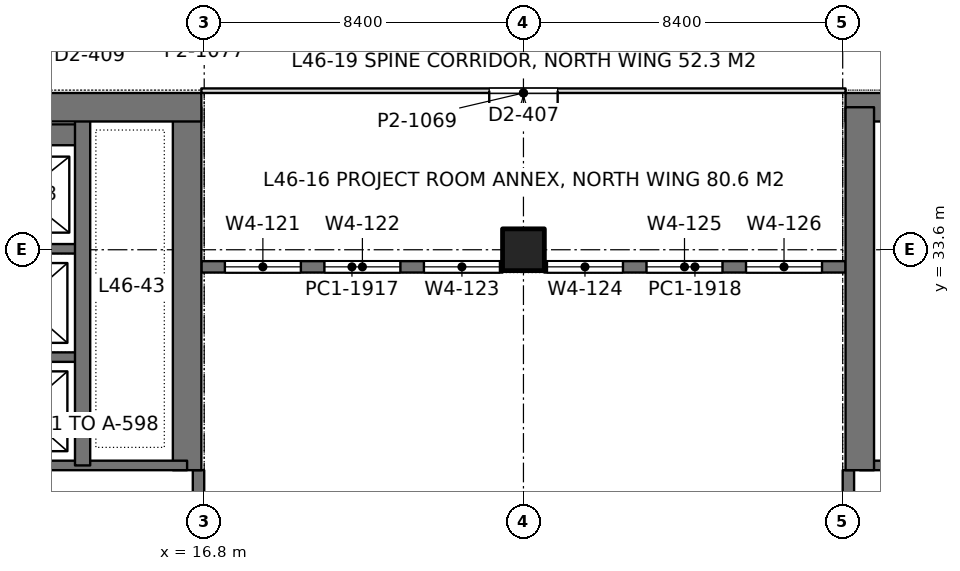
"""IFC4 building model, lengths in metres.
Left out: names, types, materials, properties, quantities, classifications, styles, units other than length and angle.
Written with IfcOpenShell. Run it as: python <this file> out.ifc"""

import sys

from ifc_helpers import new_model, si_unit, direction, frame, frame_2d, origin, origin_2d, place, context, subcontext, project, spatial, rectangle, extrude, element, fill, save


model = new_model("IFC4")
c1 = context("Model", 3, precision=1e-05, world=origin(), true_north=direction((0.0, 1.0)))
c2 = subcontext(c1, "Body", "Model", "MODEL_VIEW")
j1 = project(units=[si_unit("LENGTHUNIT", "METRE"), si_unit("PLANEANGLEUNIT", "RADIAN")], contexts=[c1])
p1 = place(None, origin())
s1 = spatial("IfcSite", under=j1, at=p1, CompositionType="ELEMENT")
p2 = place(p1, origin())
s2 = spatial("IfcBuilding", under=s1, at=p2, CompositionType="ELEMENT")
p3 = place(p2, frame((0.0, 0.0, 202.8)))
s3 = spatial("IfcBuildingStorey", under=s2, at=p3, CompositionType="ELEMENT", Elevation=202.8)
p4 = place(p3, frame((25.2, 33.6, 0.0), z_axis=(0.0, 0.0, 1.0), x_axis=(1.0, 0.0, 0.0)))
e1 = element("IfcColumn", 1, at=p4, inside=s3, PredefinedType="COLUMN", context=c2, shape_type="SweptSolid", body=[
    extrude(rectangle(XDim=1.1, YDim=1.1, at=origin_2d()), origin(), (0.0, 0.0, 1.0), 4.2),
])
p5 = place(p3, frame((-1.125, 37.35, 0.0), z_axis=(0.0, 0.0, 1.0), x_axis=(1.0, 0.0, 0.0)))
e2 = element("IfcWall", 2, at=p5, inside=s3, PredefinedType="SHEAR", context=c2, shape_type="SweptSolid", body=[
    extrude(rectangle(XDim=17.85, YDim=0.75, at=frame_2d((8.925, 0.0))), origin(), (0.0, 0.0, 1.0), 4.2),
])
p6 = place(p5, frame((8.875, 0.0, 0.0)))
e3 = element("IfcOpeningElement", 3, at=p6, cuts=e2, PredefinedType="OPENING", context=c2, shape_type="SweptSolid", body=[
    extrude(rectangle(XDim=1.8, YDim=2.4, at=frame_2d((0.9, 1.2))), frame((0.0, 0.385, 0.0), z_axis=(0.0, -1.0, 0.0), x_axis=(1.0, 0.0, 0.0)), (0.0, 0.0, 1.0), 0.77),
])
p7 = place(p3, frame((16.35, 27.8, 0.0), z_axis=(0.0, 0.0, 1.0), x_axis=(0.0, 1.0, 0.0)))
e4 = element("IfcWall", 4, at=p7, inside=s3, PredefinedType="SHEAR", context=c2, shape_type="SweptSolid", body=[
    extrude(rectangle(XDim=9.55, YDim=0.75, at=frame_2d((4.775, 0.0))), origin(), (0.0, 0.0, 1.0), 4.2),
])
p8 = place(p3, frame((13.6, 27.925, 0.0), z_axis=(0.0, 0.0, 1.0), x_axis=(0.0, 1.0, 0.0)))
e5 = element("IfcWall", 5, at=p8, inside=s3, PredefinedType="SHEAR", context=c2, shape_type="SweptSolid", body=[
    extrude(rectangle(XDim=9.425, YDim=0.4, at=frame_2d((4.712, 0.0))), origin(), (0.0, 0.0, 1.0), 4.2),
])
p9 = place(p3, frame((10.4, 27.925, 0.0), z_axis=(0.0, 0.0, 1.0), x_axis=(1.0, 0.0, 0.0)))
e6 = element("IfcWall", 6, at=p9, inside=s3, PredefinedType="SHEAR", context=c2, shape_type="SweptSolid", body=[
    extrude(rectangle(XDim=5.95, YDim=0.25, at=frame_2d((2.975, 0.0))), origin(), (0.0, 0.0, 1.0), 4.2),
])
for number, where, z_axis, x_axis in (
    (7, (10.4, 30.775, 0.0), (0.0, 0.0, 1.0), (1.0, 0.0, 0.0)),
    (8, (10.4, 33.625, 0.0), (0.0, 0.0, 1.0), (1.0, 0.0, 0.0)),
):
    element("IfcWall", number, at=place(p3, frame(where, z_axis=z_axis, x_axis=x_axis)), inside=s3, PredefinedType="SHEAR", context=c2, shape_type="SweptSolid", body=[
        extrude(rectangle(XDim=3.2, YDim=0.25, at=frame_2d((1.6, 0.0))), origin(), (0.0, 0.0, 1.0), 4.2),
    ])
p10 = place(p3, frame((10.4, 36.625, 0.0), z_axis=(0.0, 0.0, 1.0), x_axis=(1.0, 0.0, 0.0)))
e9 = element("IfcWall", 9, at=p10, inside=s3, PredefinedType="SHEAR", context=c2, shape_type="SweptSolid", body=[
    extrude(rectangle(XDim=3.2, YDim=0.55, at=frame_2d((1.6, 0.0))), origin(), (0.0, 0.0, 1.0), 4.2),
])
p11 = place(p3, frame((33.675, 37.35, 0.0), z_axis=(0.0, 0.0, 1.0), x_axis=(1.0, 0.0, 0.0)))
e10 = element("IfcWall", 10, at=p11, inside=s3, PredefinedType="SHEAR", context=c2, shape_type="SweptSolid", body=[
    extrude(rectangle(XDim=17.85, YDim=0.75, at=frame_2d((8.925, 0.0))), origin(), (0.0, 0.0, 1.0), 4.2),
])
p12 = place(p11, frame((7.175, 0.0, 0.0)))
e11 = element("IfcOpeningElement", 11, at=p12, cuts=e10, PredefinedType="OPENING", context=c2, shape_type="SweptSolid", body=[
    extrude(rectangle(XDim=1.8, YDim=2.4, at=frame_2d((0.9, 1.2))), frame((0.0, 0.385, 0.0), z_axis=(0.0, -1.0, 0.0), x_axis=(1.0, 0.0, 0.0)), (0.0, 0.0, 1.0), 0.77),
])
p13 = place(p3, frame((34.05, 27.8, 0.0), z_axis=(0.0, 0.0, 1.0), x_axis=(0.0, 1.0, 0.0)))
e12 = element("IfcWall", 12, at=p13, inside=s3, PredefinedType="SHEAR", context=c2, shape_type="SweptSolid", body=[
    extrude(rectangle(XDim=9.55, YDim=0.75, at=frame_2d((4.775, 0.0))), origin(), (0.0, 0.0, 1.0), 4.2),
])
p14 = place(p3, frame((40.0, 27.925, 0.0), z_axis=(0.0, 0.0, 1.0), x_axis=(-1.0, 0.0, 0.0)))
e13 = element("IfcWall", 13, at=p14, inside=s3, PredefinedType="SHEAR", context=c2, shape_type="SweptSolid", body=[
    extrude(rectangle(XDim=5.95, YDim=0.25, at=frame_2d((2.975, 0.0))), origin(), (0.0, 0.0, 1.0), 4.2),
])
p15 = place(p3, frame((16.65, 17.1, 0.0), z_axis=(0.0, 0.0, 1.0), x_axis=(0.0, 1.0, 0.0)))
e14 = element("IfcWall", 14, at=p15, inside=s3, PredefinedType="SOLIDWALL", context=c2, shape_type="SweptSolid", body=[
    extrude(rectangle(XDim=10.7, YDim=0.3, at=frame_2d((5.35, 0.0))), origin(), (0.0, 0.0, 1.0), 4.05),
])
p16 = place(p15, frame((0.55, 0.0, 0.9)))
e15 = element("IfcOpeningElement", 15, at=p16, cuts=e14, PredefinedType="OPENING", context=c2, shape_type="SweptSolid", body=[
    extrude(rectangle(XDim=2.0, YDim=1.9, at=frame_2d((1.0, 0.95))), frame((0.0, 0.16, 0.0), z_axis=(0.0, -1.0, 0.0), x_axis=(1.0, 0.0, 0.0)), (0.0, 0.0, 1.0), 0.32),
])
p17 = place(p15, frame((2.9, 0.0, 0.9)))
e16 = element("IfcOpeningElement", 16, at=p17, cuts=e14, PredefinedType="OPENING", context=c2, shape_type="SweptSolid", body=[
    extrude(rectangle(XDim=2.0, YDim=1.9, at=frame_2d((1.0, 0.95))), frame((0.0, 0.16, 0.0), z_axis=(0.0, -1.0, 0.0), x_axis=(1.0, 0.0, 0.0)), (0.0, 0.0, 1.0), 0.32),
])
p18 = place(p15, frame((7.675, 0.0, 0.9)))
e17 = element("IfcOpeningElement", 17, at=p18, cuts=e14, PredefinedType="OPENING", context=c2, shape_type="SweptSolid", body=[
    extrude(rectangle(XDim=2.0, YDim=1.9, at=frame_2d((1.0, 0.95))), frame((0.0, 0.16, 0.0), z_axis=(0.0, -1.0, 0.0), x_axis=(1.0, 0.0, 0.0)), (0.0, 0.0, 1.0), 0.32),
])
p19 = place(p3, frame((33.75, 17.1, 0.0), z_axis=(0.0, 0.0, 1.0), x_axis=(0.0, 1.0, 0.0)))
e18 = element("IfcWall", 18, at=p19, inside=s3, PredefinedType="SOLIDWALL", context=c2, shape_type="SweptSolid", body=[
    extrude(rectangle(XDim=10.7, YDim=0.3, at=frame_2d((5.35, 0.0))), origin(), (0.0, 0.0, 1.0), 4.05),
])
p20 = place(p19, frame((0.55, 0.0, 0.9)))
e19 = element("IfcOpeningElement", 19, at=p20, cuts=e18, PredefinedType="OPENING", context=c2, shape_type="SweptSolid", body=[
    extrude(rectangle(XDim=2.0, YDim=1.9, at=frame_2d((1.0, 0.95))), frame((0.0, 0.16, 0.0), z_axis=(0.0, -1.0, 0.0), x_axis=(1.0, 0.0, 0.0)), (0.0, 0.0, 1.0), 0.32),
])
p21 = place(p19, frame((2.9, 0.0, 0.9)))
e20 = element("IfcOpeningElement", 20, at=p21, cuts=e18, PredefinedType="OPENING", context=c2, shape_type="SweptSolid", body=[
    extrude(rectangle(XDim=2.0, YDim=1.9, at=frame_2d((1.0, 0.95))), frame((0.0, 0.16, 0.0), z_axis=(0.0, -1.0, 0.0), x_axis=(1.0, 0.0, 0.0)), (0.0, 0.0, 1.0), 0.32),
])
p22 = place(p19, frame((7.675, 0.0, 0.9)))
e21 = element("IfcOpeningElement", 21, at=p22, cuts=e18, PredefinedType="OPENING", context=c2, shape_type="SweptSolid", body=[
    extrude(rectangle(XDim=2.0, YDim=1.9, at=frame_2d((1.0, 0.95))), frame((0.0, 0.16, 0.0), z_axis=(0.0, -1.0, 0.0), x_axis=(1.0, 0.0, 0.0)), (0.0, 0.0, 1.0), 0.32),
])
p23 = place(p3, frame((16.725, 33.15, 0.0), z_axis=(0.0, 0.0, 1.0), x_axis=(1.0, 0.0, 0.0)))
e22 = element("IfcWall", 22, at=p23, inside=s3, PredefinedType="SOLIDWALL", context=c2, shape_type="SweptSolid", body=[
    extrude(rectangle(XDim=7.925, YDim=0.3, at=frame_2d((3.962, 0.0))), origin(), (0.0, 0.0, 1.0), 4.05),
])
p24 = place(p23, frame((0.619, 0.0, 0.9)))
e23 = element("IfcOpeningElement", 23, at=p24, cuts=e22, PredefinedType="OPENING", context=c2, shape_type="SweptSolid", body=[
    extrude(rectangle(XDim=2.0, YDim=1.9, at=frame_2d((1.0, 0.95))), frame((0.0, 0.16, 0.0), z_axis=(0.0, -1.0, 0.0), x_axis=(1.0, 0.0, 0.0)), (0.0, 0.0, 1.0), 0.32),
])
p25 = place(p23, frame((3.238, 0.0, 0.9)))
e24 = element("IfcOpeningElement", 24, at=p25, cuts=e22, PredefinedType="OPENING", context=c2, shape_type="SweptSolid", body=[
    extrude(rectangle(XDim=2.0, YDim=1.9, at=frame_2d((1.0, 0.95))), frame((0.0, 0.16, 0.0), z_axis=(0.0, -1.0, 0.0), x_axis=(1.0, 0.0, 0.0)), (0.0, 0.0, 1.0), 0.32),
])
p26 = place(p23, frame((5.856, 0.0, 0.9)))
e25 = element("IfcOpeningElement", 25, at=p26, cuts=e22, PredefinedType="OPENING", context=c2, shape_type="SweptSolid", body=[
    extrude(rectangle(XDim=2.0, YDim=1.9, at=frame_2d((1.0, 0.95))), frame((0.0, 0.16, 0.0), z_axis=(0.0, -1.0, 0.0), x_axis=(1.0, 0.0, 0.0)), (0.0, 0.0, 1.0), 0.32),
])
p27 = place(p3, frame((25.75, 33.15, 0.0), z_axis=(0.0, 0.0, 1.0), x_axis=(1.0, 0.0, 0.0)))
e26 = element("IfcWall", 26, at=p27, inside=s3, PredefinedType="SOLIDWALL", context=c2, shape_type="SweptSolid", body=[
    extrude(rectangle(XDim=7.925, YDim=0.3, at=frame_2d((3.962, 0.0))), origin(), (0.0, 0.0, 1.0), 4.05),
])
p28 = place(p27, frame((0.069, 0.0, 0.9)))
e27 = element("IfcOpeningElement", 27, at=p28, cuts=e26, PredefinedType="OPENING", context=c2, shape_type="SweptSolid", body=[
    extrude(rectangle(XDim=2.0, YDim=1.9, at=frame_2d((1.0, 0.95))), frame((0.0, 0.16, 0.0), z_axis=(0.0, -1.0, 0.0), x_axis=(1.0, 0.0, 0.0)), (0.0, 0.0, 1.0), 0.32),
])
p29 = place(p27, frame((2.688, 0.0, 0.9)))
e28 = element("IfcOpeningElement", 28, at=p29, cuts=e26, PredefinedType="OPENING", context=c2, shape_type="SweptSolid", body=[
    extrude(rectangle(XDim=2.0, YDim=1.9, at=frame_2d((1.0, 0.95))), frame((0.0, 0.16, 0.0), z_axis=(0.0, -1.0, 0.0), x_axis=(1.0, 0.0, 0.0)), (0.0, 0.0, 1.0), 0.32),
])
p30 = place(p27, frame((5.306, 0.0, 0.9)))
e29 = element("IfcOpeningElement", 29, at=p30, cuts=e26, PredefinedType="OPENING", context=c2, shape_type="SweptSolid", body=[
    extrude(rectangle(XDim=2.0, YDim=1.9, at=frame_2d((1.0, 0.95))), frame((0.0, 0.16, 0.0), z_axis=(0.0, -1.0, 0.0), x_axis=(1.0, 0.0, 0.0)), (0.0, 0.0, 1.0), 0.32),
])
p31 = place(p3, frame((16.725, 37.785, 0.0), z_axis=(0.0, 0.0, 1.0), x_axis=(1.0, 0.0, 0.0)))
e30 = element("IfcWall", 30, at=p31, inside=s3, PredefinedType="PARTITIONING", context=c2, shape_type="SweptSolid", body=[
    extrude(rectangle(XDim=16.95, YDim=0.12, at=frame_2d((8.475, 0.0))), origin(), (0.0, 0.0, 1.0), 3.55),
])
p32 = place(p31, frame((7.575, 0.0, 0.0)))
e31 = element("IfcOpeningElement", 31, at=p32, cuts=e30, PredefinedType="OPENING", context=c2, shape_type="SweptSolid", body=[
    extrude(rectangle(XDim=1.8, YDim=2.2, at=frame_2d((0.9, 1.1))), frame((0.0, 0.07, 0.0), z_axis=(0.0, -1.0, 0.0), x_axis=(1.0, 0.0, 0.0)), (0.0, 0.0, 1.0), 0.14),
])
p33 = place(p24, origin())
e32 = element("IfcWindow", 32, at=p33, inside=s3, PartitioningType="SINGLE_PANEL", PredefinedType="WINDOW", context=c2, shape_type="SweptSolid", body=[
    extrude(rectangle(XDim=2.0, YDim=1.9, at=frame_2d((1.0, 0.95))), frame((0.0, 0.03, 0.0), z_axis=(0.0, -1.0, 0.0), x_axis=(1.0, 0.0, 0.0)), (0.0, 0.0, 1.0), 0.06),
])
fill(e23, e32)
p34 = place(p25, origin())
e33 = element("IfcWindow", 33, at=p34, inside=s3, PartitioningType="SINGLE_PANEL", PredefinedType="WINDOW", context=c2, shape_type="SweptSolid", body=[
    extrude(rectangle(XDim=2.0, YDim=1.9, at=frame_2d((1.0, 0.95))), frame((0.0, 0.03, 0.0), z_axis=(0.0, -1.0, 0.0), x_axis=(1.0, 0.0, 0.0)), (0.0, 0.0, 1.0), 0.06),
])
fill(e24, e33)
p35 = place(p26, origin())
e34 = element("IfcWindow", 34, at=p35, inside=s3, PartitioningType="SINGLE_PANEL", PredefinedType="WINDOW", context=c2, shape_type="SweptSolid", body=[
    extrude(rectangle(XDim=2.0, YDim=1.9, at=frame_2d((1.0, 0.95))), frame((0.0, 0.03, 0.0), z_axis=(0.0, -1.0, 0.0), x_axis=(1.0, 0.0, 0.0)), (0.0, 0.0, 1.0), 0.06),
])
fill(e25, e34)
p36 = place(p28, origin())
e35 = element("IfcWindow", 35, at=p36, inside=s3, PartitioningType="SINGLE_PANEL", PredefinedType="WINDOW", context=c2, shape_type="SweptSolid", body=[
    extrude(rectangle(XDim=2.0, YDim=1.9, at=frame_2d((1.0, 0.95))), frame((0.0, 0.03, 0.0), z_axis=(0.0, -1.0, 0.0), x_axis=(1.0, 0.0, 0.0)), (0.0, 0.0, 1.0), 0.06),
])
fill(e27, e35)
p37 = place(p29, origin())
e36 = element("IfcWindow", 36, at=p37, inside=s3, PartitioningType="SINGLE_PANEL", PredefinedType="WINDOW", context=c2, shape_type="SweptSolid", body=[
    extrude(rectangle(XDim=2.0, YDim=1.9, at=frame_2d((1.0, 0.95))), frame((0.0, 0.03, 0.0), z_axis=(0.0, -1.0, 0.0), x_axis=(1.0, 0.0, 0.0)), (0.0, 0.0, 1.0), 0.06),
])
fill(e28, e36)
p38 = place(p30, origin())
e37 = element("IfcWindow", 37, at=p38, inside=s3, PartitioningType="SINGLE_PANEL", PredefinedType="WINDOW", context=c2, shape_type="SweptSolid", body=[
    extrude(rectangle(XDim=2.0, YDim=1.9, at=frame_2d((1.0, 0.95))), frame((0.0, 0.03, 0.0), z_axis=(0.0, -1.0, 0.0), x_axis=(1.0, 0.0, 0.0)), (0.0, 0.0, 1.0), 0.06),
])
fill(e29, e37)
p39 = place(p32, frame((1.8, 0.0, 0.0), z_axis=(0.0, 0.0, 1.0), x_axis=(-1.0, 0.0, 0.0)))
e38 = element("IfcDoor", 38, at=p39, inside=s3, OperationType="DOUBLE_DOOR_SINGLE_SWING", PredefinedType="DOOR", context=c2, shape_type="SweptSolid", body=[
    extrude(rectangle(XDim=1.8, YDim=2.2, at=frame_2d((0.9, 1.1))), frame((0.0, 0.025, 0.0), z_axis=(0.0, -1.0, 0.0), x_axis=(1.0, 0.0, 0.0)), (0.0, 0.0, 1.0), 0.05),
])
fill(e31, e38)
save(model, sys.argv[1])
